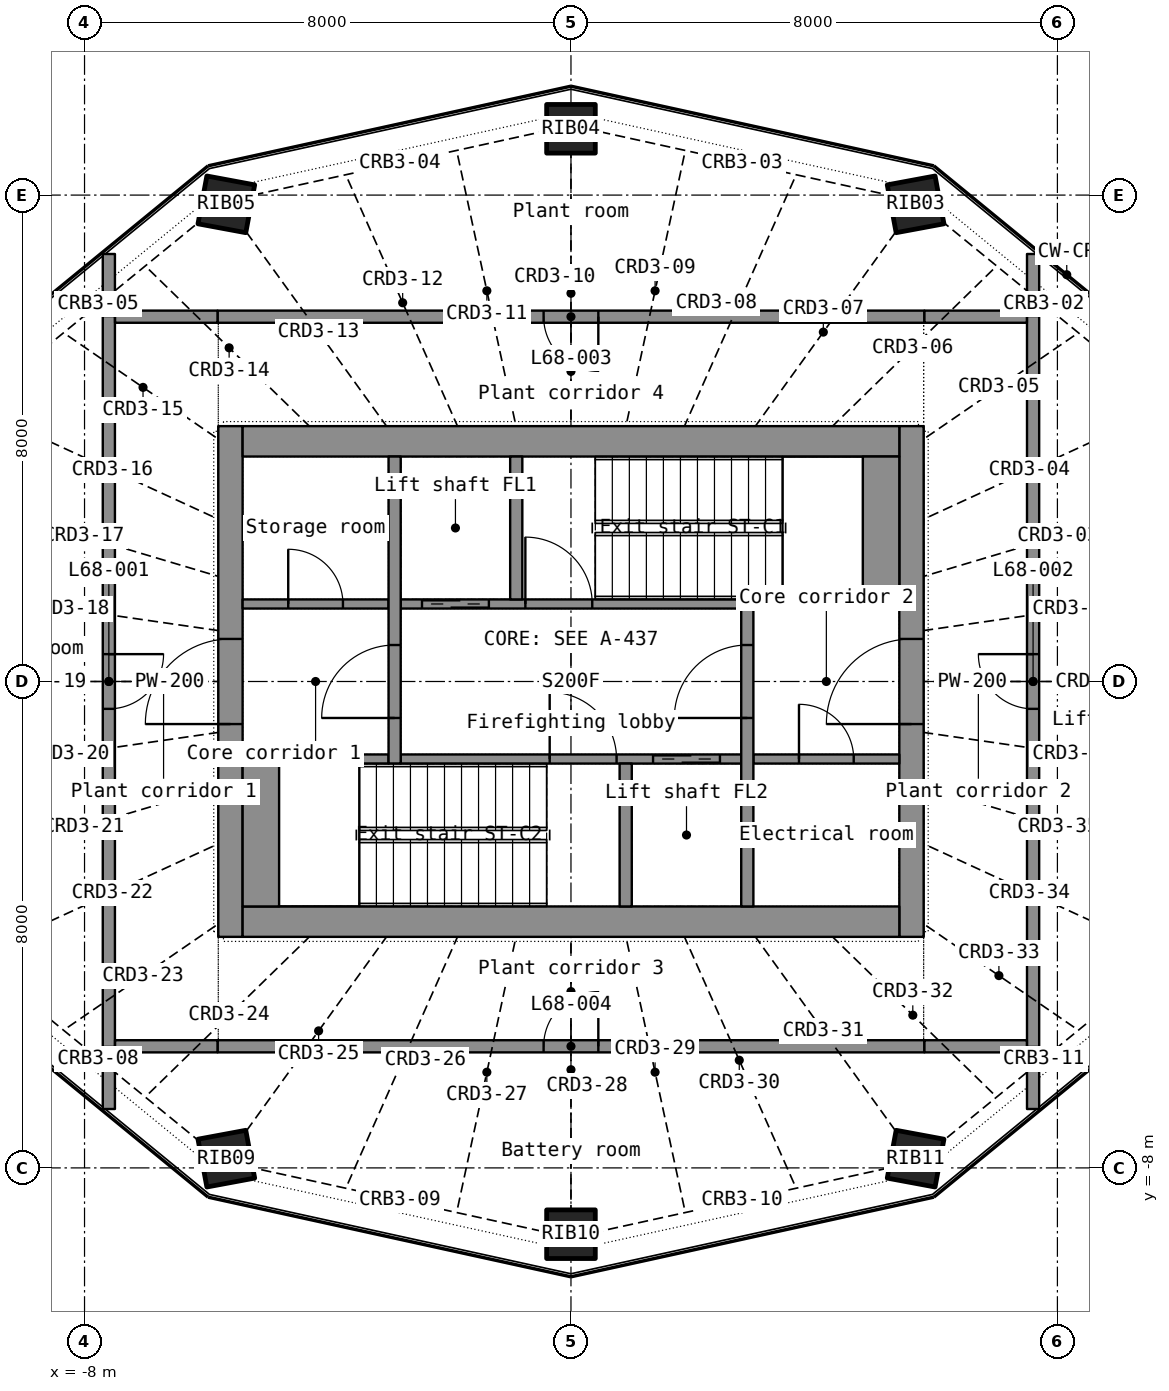
"""IFC4 building model, lengths in metres.
Left out: names, types, materials, properties, quantities, classifications, styles, units other than length and angle.
Written with IfcOpenShell. Run it as: python <this file> out.ifc"""

import sys

from ifc_helpers import new_model, si_unit, direction, frame, frame_2d, origin, origin_2d, place, context, subcontext, project, spatial, rectangle, hollow_rectangle, extrude, element, fill, save


model = new_model("IFC4")
c1 = context("Model", 3, precision=1e-05, world=origin(), true_north=direction((0.0, 1.0)))
c2 = subcontext(c1, "Body", "Model", "MODEL_VIEW")
j1 = project(units=[si_unit("LENGTHUNIT", "METRE"), si_unit("PLANEANGLEUNIT", "RADIAN")], contexts=[c1])
p1 = place(None, origin())
s1 = spatial("IfcSite", under=j1, at=p1, CompositionType="ELEMENT")
p2 = place(p1, origin())
s2 = spatial("IfcBuilding", under=s1, at=p2, CompositionType="ELEMENT")
p3 = place(p2, frame((0.0, 0.0, 280.4)))
s3 = spatial("IfcBuildingStorey", under=s2, at=p3, CompositionType="ELEMENT", Elevation=280.4)
p4 = place(p3, frame((5.668, 7.848, 0.0), z_axis=(-0.069183291, -0.095787468, 0.992994679), x_axis=(0.903250965, -0.428569231, 0.021589555)))
e1 = element("IfcColumn", 1, at=p4, inside=s3, PredefinedType="COLUMN", context=c2, shape_type="SweptSolid", body=[
    extrude(hollow_rectangle(XDim=0.8, YDim=0.8, WallThickness=0.025, at=origin_2d()), origin(), (0.0, 0.0, 1.0), 3.928),
])
p5 = place(p3, frame((0.0, 9.091, 0.0), z_axis=(0.0, -0.111046025, 0.993815265), x_axis=(1.0, 0.0, 0.0)))
e2 = element("IfcColumn", 2, at=p5, inside=s3, PredefinedType="COLUMN", context=c2, shape_type="SweptSolid", body=[
    extrude(hollow_rectangle(XDim=0.8, YDim=0.8, WallThickness=0.025, at=origin_2d()), origin(), (0.0, 0.0, 1.0), 3.924),
])
for number, where, z_axis, x_axis in (
    (3, (-5.668, 7.848, 0.0), (0.069, -0.096, 0.993), (0.903, 0.429, -0.022)),
    (4, (-5.668, -7.848, 0.0), (0.069, 0.096, 0.993), (-0.903, 0.429, 0.022)),
):
    element("IfcColumn", number, at=place(p3, frame(where, z_axis=z_axis, x_axis=x_axis)), inside=s3, PredefinedType="COLUMN", context=c2, shape_type="SweptSolid", body=[
        extrude(hollow_rectangle(XDim=0.8, YDim=0.8, WallThickness=0.025, at=origin_2d()), origin(), (0.0, 0.0, 1.0), 3.928),
    ])
p6 = place(p3, frame((0.0, -9.091, 0.0), z_axis=(0.0, 0.111046025, 0.993815265), x_axis=(-1.0, 0.0, 0.0)))
e5 = element("IfcColumn", 5, at=p6, inside=s3, PredefinedType="COLUMN", context=c2, shape_type="SweptSolid", body=[
    extrude(hollow_rectangle(XDim=0.8, YDim=0.8, WallThickness=0.025, at=origin_2d()), origin(), (0.0, 0.0, 1.0), 3.924),
])
p7 = place(p3, frame((5.668, -7.848, 0.0), z_axis=(-0.069183291, 0.095787468, 0.992994679), x_axis=(-0.903250965, -0.428569231, -0.021589555)))
e6 = element("IfcColumn", 6, at=p7, inside=s3, PredefinedType="COLUMN", context=c2, shape_type="SweptSolid", body=[
    extrude(hollow_rectangle(XDim=0.8, YDim=0.8, WallThickness=0.025, at=origin_2d()), origin(), (0.0, 0.0, 1.0), 3.928),
])
p8 = place(p3, frame((-5.6, -4.2, 0.0), z_axis=(0.0, 0.0, 1.0), x_axis=(0.0, 1.0, 0.0)))
e7 = element("IfcWall", 7, at=p8, inside=s3, PredefinedType="SHEAR", context=c2, shape_type="SweptSolid", body=[
    extrude(rectangle(XDim=8.4, YDim=0.4, at=frame_2d((4.2, 0.0))), origin(), (0.0, 0.0, 1.0), 3.5),
])
p9 = place(p8, frame((3.5, 0.0, 0.0)))
e8 = element("IfcOpeningElement", 8, at=p9, cuts=e7, PredefinedType="OPENING", context=c2, shape_type="SweptSolid", body=[
    extrude(rectangle(XDim=1.4, YDim=2.2, at=frame_2d((0.7, 1.1))), frame((0.0, 0.21, 0.0), z_axis=(0.0, -1.0, 0.0), x_axis=(1.0, 0.0, 0.0)), (0.0, 0.0, 1.0), 0.42),
])
p10 = place(p3, frame((5.6, -4.2, 0.0), z_axis=(0.0, 0.0, 1.0), x_axis=(0.0, 1.0, 0.0)))
e9 = element("IfcWall", 9, at=p10, inside=s3, PredefinedType="SHEAR", context=c2, shape_type="SweptSolid", body=[
    extrude(rectangle(XDim=8.4, YDim=0.4, at=frame_2d((4.2, 0.0))), origin(), (0.0, 0.0, 1.0), 3.5),
])
p11 = place(p10, frame((3.5, 0.0, 0.0)))
e10 = element("IfcOpeningElement", 10, at=p11, cuts=e9, PredefinedType="OPENING", context=c2, shape_type="SweptSolid", body=[
    extrude(rectangle(XDim=1.4, YDim=2.2, at=frame_2d((0.7, 1.1))), frame((0.0, 0.21, 0.0), z_axis=(0.0, -1.0, 0.0), x_axis=(1.0, 0.0, 0.0)), (0.0, 0.0, 1.0), 0.42),
])
for number, where, z_axis, x_axis in (
    (11, (-5.4, -3.95, 0.0), (0.0, 0.0, 1.0), (1.0, 0.0, 0.0)),
    (12, (-5.4, 3.95, 0.0), (0.0, 0.0, 1.0), (1.0, 0.0, 0.0)),
):
    element("IfcWall", number, at=place(p3, frame(where, z_axis=z_axis, x_axis=x_axis)), inside=s3, PredefinedType="SHEAR", context=c2, shape_type="SweptSolid", body=[
        extrude(rectangle(XDim=10.8, YDim=0.5, at=frame_2d((5.4, 0.0))), origin(), (0.0, 0.0, 1.0), 3.5),
    ])
p12 = place(p3, frame((-5.4, -1.275, 0.0), z_axis=(0.0, 0.0, 1.0), x_axis=(1.0, 0.0, 0.0)))
e13 = element("IfcWall", 13, at=p12, inside=s3, PredefinedType="SHEAR", context=c2, shape_type="SweptSolid", body=[
    extrude(rectangle(XDim=2.4, YDim=0.15, at=frame_2d((1.2, 0.0))), origin(), (0.0, 0.0, 1.0), 3.5),
])
p13 = place(p3, frame((-2.8, -1.275, 0.0), z_axis=(0.0, 0.0, 1.0), x_axis=(1.0, 0.0, 0.0)))
e14 = element("IfcWall", 14, at=p13, inside=s3, PredefinedType="SHEAR", context=c2, shape_type="SweptSolid", body=[
    extrude(rectangle(XDim=5.6, YDim=0.15, at=frame_2d((2.8, 0.0))), origin(), (0.0, 0.0, 1.0), 3.5),
])
p14 = place(p13, frame((4.15, 0.0, 0.0)))
e15 = element("IfcOpeningElement", 15, at=p14, cuts=e14, PredefinedType="OPENING", context=c2, shape_type="SweptSolid", body=[
    extrude(rectangle(XDim=1.1, YDim=2.2, at=frame_2d((0.55, 1.1))), frame((0.0, 0.085, 0.0), z_axis=(0.0, -1.0, 0.0), x_axis=(1.0, 0.0, 0.0)), (0.0, 0.0, 1.0), 0.17),
])
p15 = place(p13, frame((2.45, 0.0, 0.0)))
e16 = element("IfcOpeningElement", 16, at=p15, cuts=e14, PredefinedType="OPENING", context=c2, shape_type="SweptSolid", body=[
    extrude(rectangle(XDim=1.1, YDim=2.15, at=frame_2d((0.55, 1.075))), frame((0.0, 0.085, 0.0), z_axis=(0.0, -1.0, 0.0), x_axis=(1.0, 0.0, 0.0)), (0.0, 0.0, 1.0), 0.17),
])
p16 = place(p3, frame((3.0, -1.275, 0.0), z_axis=(0.0, 0.0, 1.0), x_axis=(1.0, 0.0, 0.0)))
e17 = element("IfcWall", 17, at=p16, inside=s3, PredefinedType="PARTITIONING", context=c2, shape_type="SweptSolid", body=[
    extrude(rectangle(XDim=2.4, YDim=0.15, at=frame_2d((1.2, 0.0))), origin(), (0.0, 0.0, 1.0), 3.5),
])
p17 = place(p16, frame((0.75, 0.0, 0.0)))
e18 = element("IfcOpeningElement", 18, at=p17, cuts=e17, PredefinedType="OPENING", context=c2, shape_type="SweptSolid", body=[
    extrude(rectangle(XDim=0.9, YDim=2.1, at=frame_2d((0.45, 1.05))), frame((0.0, 0.085, 0.0), z_axis=(0.0, -1.0, 0.0), x_axis=(1.0, 0.0, 0.0)), (0.0, 0.0, 1.0), 0.17),
])
p18 = place(p3, frame((-5.4, 1.275, 0.0), z_axis=(0.0, 0.0, 1.0), x_axis=(1.0, 0.0, 0.0)))
e19 = element("IfcWall", 19, at=p18, inside=s3, PredefinedType="PARTITIONING", context=c2, shape_type="SweptSolid", body=[
    extrude(rectangle(XDim=2.4, YDim=0.15, at=frame_2d((1.2, 0.0))), origin(), (0.0, 0.0, 1.0), 3.5),
])
p19 = place(p18, frame((0.75, 0.0, 0.0)))
e20 = element("IfcOpeningElement", 20, at=p19, cuts=e19, PredefinedType="OPENING", context=c2, shape_type="SweptSolid", body=[
    extrude(rectangle(XDim=0.9, YDim=2.1, at=frame_2d((0.45, 1.05))), frame((0.0, 0.085, 0.0), z_axis=(0.0, -1.0, 0.0), x_axis=(1.0, 0.0, 0.0)), (0.0, 0.0, 1.0), 0.17),
])
p20 = place(p3, frame((-2.8, 1.275, 0.0), z_axis=(0.0, 0.0, 1.0), x_axis=(1.0, 0.0, 0.0)))
e21 = element("IfcWall", 21, at=p20, inside=s3, PredefinedType="SHEAR", context=c2, shape_type="SweptSolid", body=[
    extrude(rectangle(XDim=5.6, YDim=0.15, at=frame_2d((2.8, 0.0))), origin(), (0.0, 0.0, 1.0), 3.5),
])
p21 = place(p20, frame((0.35, 0.0, 0.0)))
e22 = element("IfcOpeningElement", 22, at=p21, cuts=e21, PredefinedType="OPENING", context=c2, shape_type="SweptSolid", body=[
    extrude(rectangle(XDim=1.1, YDim=2.2, at=frame_2d((0.55, 1.1))), frame((0.0, 0.085, 0.0), z_axis=(0.0, -1.0, 0.0), x_axis=(1.0, 0.0, 0.0)), (0.0, 0.0, 1.0), 0.17),
])
p22 = place(p20, frame((2.05, 0.0, 0.0)))
e23 = element("IfcOpeningElement", 23, at=p22, cuts=e21, PredefinedType="OPENING", context=c2, shape_type="SweptSolid", body=[
    extrude(rectangle(XDim=1.1, YDim=2.15, at=frame_2d((0.55, 1.075))), frame((0.0, 0.085, 0.0), z_axis=(0.0, -1.0, 0.0), x_axis=(1.0, 0.0, 0.0)), (0.0, 0.0, 1.0), 0.17),
])
p23 = place(p3, frame((3.0, 1.275, 0.0), z_axis=(0.0, 0.0, 1.0), x_axis=(1.0, 0.0, 0.0)))
e24 = element("IfcWall", 24, at=p23, inside=s3, PredefinedType="SHEAR", context=c2, shape_type="SweptSolid", body=[
    extrude(rectangle(XDim=2.4, YDim=0.15, at=frame_2d((1.2, 0.0))), origin(), (0.0, 0.0, 1.0), 3.5),
])
p24 = place(p3, frame((-2.9, -1.35, 0.0), z_axis=(0.0, 0.0, 1.0), x_axis=(0.0, 1.0, 0.0)))
e25 = element("IfcWall", 25, at=p24, inside=s3, PredefinedType="SHEAR", context=c2, shape_type="SweptSolid", body=[
    extrude(rectangle(XDim=5.05, YDim=0.2, at=frame_2d((2.525, 0.0))), origin(), (0.0, 0.0, 1.0), 3.5),
])
p25 = place(p24, frame((0.75, 0.0, 0.0)))
e26 = element("IfcOpeningElement", 26, at=p25, cuts=e25, PredefinedType="OPENING", context=c2, shape_type="SweptSolid", body=[
    extrude(rectangle(XDim=1.2, YDim=2.2, at=frame_2d((0.6, 1.1))), frame((0.0, 0.11, 0.0), z_axis=(0.0, -1.0, 0.0), x_axis=(1.0, 0.0, 0.0)), (0.0, 0.0, 1.0), 0.22),
])
p26 = place(p3, frame((2.9, -3.7, 0.0), z_axis=(0.0, 0.0, 1.0), x_axis=(0.0, 1.0, 0.0)))
e27 = element("IfcWall", 27, at=p26, inside=s3, PredefinedType="SHEAR", context=c2, shape_type="SweptSolid", body=[
    extrude(rectangle(XDim=5.05, YDim=0.2, at=frame_2d((2.525, 0.0))), origin(), (0.0, 0.0, 1.0), 3.5),
])
p27 = place(p26, frame((3.1, 0.0, 0.0)))
e28 = element("IfcOpeningElement", 28, at=p27, cuts=e27, PredefinedType="OPENING", context=c2, shape_type="SweptSolid", body=[
    extrude(rectangle(XDim=1.2, YDim=2.2, at=frame_2d((0.6, 1.1))), frame((0.0, 0.11, 0.0), z_axis=(0.0, -1.0, 0.0), x_axis=(1.0, 0.0, 0.0)), (0.0, 0.0, 1.0), 0.22),
])
for number, where, z_axis, x_axis in (
    (29, (-0.9, 1.35, 0.0), (0.0, 0.0, 1.0), (0.0, 1.0, 0.0)),
    (30, (0.9, -3.7, 0.0), (0.0, 0.0, 1.0), (0.0, 1.0, 0.0)),
):
    element("IfcWall", number, at=place(p3, frame(where, z_axis=z_axis, x_axis=x_axis)), inside=s3, PredefinedType="SHEAR", context=c2, shape_type="SweptSolid", body=[
        extrude(rectangle(XDim=2.35, YDim=0.2, at=frame_2d((1.175, 0.0))), origin(), (0.0, 0.0, 1.0), 3.5),
    ])
for number, where, z_axis, x_axis in (
    (31, (5.1, 1.35, 0.0), (0.0, 0.0, 1.0), (0.0, 1.0, 0.0)),
    (32, (-5.1, -3.7, 0.0), (0.0, 0.0, 1.0), (0.0, 1.0, 0.0)),
):
    element("IfcWall", number, at=place(p3, frame(where, z_axis=z_axis, x_axis=x_axis)), inside=s3, PredefinedType="SHEAR", context=c2, shape_type="SweptSolid", body=[
        extrude(rectangle(XDim=2.35, YDim=0.6, at=frame_2d((1.175, 0.0))), origin(), (0.0, 0.0, 1.0), 3.5),
    ])
p28 = place(p3, frame((-7.6, 6.012, 0.0), z_axis=(0.0, 0.0, 1.0), x_axis=(0.0, -1.0, 0.0)))
e33 = element("IfcWall", 33, at=p28, inside=s3, PredefinedType="PARTITIONING", context=c2, shape_type="SweptSolid", body=[
    extrude(rectangle(XDim=12.024, YDim=0.2, at=frame_2d((6.012, 0.0))), origin(), (0.0, 0.0, 1.0), 2.9),
])
p29 = place(p28, frame((5.562, 0.0, 0.0)))
e34 = element("IfcOpeningElement", 34, at=p29, cuts=e33, PredefinedType="OPENING", context=c2, shape_type="SweptSolid", body=[
    extrude(rectangle(XDim=0.9, YDim=2.1, at=frame_2d((0.45, 1.05))), frame((0.0, 0.11, 0.0), z_axis=(0.0, -1.0, 0.0), x_axis=(1.0, 0.0, 0.0)), (0.0, 0.0, 1.0), 0.22),
])
p30 = place(p3, frame((7.6, -6.012, 0.0), z_axis=(0.0, 0.0, 1.0), x_axis=(0.0, 1.0, 0.0)))
e35 = element("IfcWall", 35, at=p30, inside=s3, PredefinedType="PARTITIONING", context=c2, shape_type="SweptSolid", body=[
    extrude(rectangle(XDim=12.024, YDim=0.2, at=frame_2d((6.012, 0.0))), origin(), (0.0, 0.0, 1.0), 2.9),
])
p31 = place(p30, frame((5.562, 0.0, 0.0)))
e36 = element("IfcOpeningElement", 36, at=p31, cuts=e35, PredefinedType="OPENING", context=c2, shape_type="SweptSolid", body=[
    extrude(rectangle(XDim=0.9, YDim=2.1, at=frame_2d((0.45, 1.05))), frame((0.0, 0.11, 0.0), z_axis=(0.0, -1.0, 0.0), x_axis=(1.0, 0.0, 0.0)), (0.0, 0.0, 1.0), 0.22),
])
p32 = place(p3, frame((-5.812, -6.0, 0.0), z_axis=(0.0, 0.0, 1.0), x_axis=(1.0, 0.0, 0.0)))
e37 = element("IfcWall", 37, at=p32, inside=s3, PredefinedType="PARTITIONING", context=c2, shape_type="SweptSolid", body=[
    extrude(rectangle(XDim=11.624, YDim=0.2, at=frame_2d((5.812, 0.0))), origin(), (0.0, 0.0, 1.0), 2.9),
])
p33 = place(p32, frame((5.362, 0.0, 0.0)))
e38 = element("IfcOpeningElement", 38, at=p33, cuts=e37, PredefinedType="OPENING", context=c2, shape_type="SweptSolid", body=[
    extrude(rectangle(XDim=0.9, YDim=2.1, at=frame_2d((0.45, 1.05))), frame((0.0, 0.11, 0.0), z_axis=(0.0, -1.0, 0.0), x_axis=(1.0, 0.0, 0.0)), (0.0, 0.0, 1.0), 0.22),
])
p34 = place(p3, frame((5.812, 6.0, 0.0), z_axis=(0.0, 0.0, 1.0), x_axis=(-1.0, 0.0, 0.0)))
e39 = element("IfcWall", 39, at=p34, inside=s3, PredefinedType="PARTITIONING", context=c2, shape_type="SweptSolid", body=[
    extrude(rectangle(XDim=11.624, YDim=0.2, at=frame_2d((5.812, 0.0))), origin(), (0.0, 0.0, 1.0), 2.9),
])
p35 = place(p34, frame((5.362, 0.0, 0.0)))
e40 = element("IfcOpeningElement", 40, at=p35, cuts=e39, PredefinedType="OPENING", context=c2, shape_type="SweptSolid", body=[
    extrude(rectangle(XDim=0.9, YDim=2.1, at=frame_2d((0.45, 1.05))), frame((0.0, 0.11, 0.0), z_axis=(0.0, -1.0, 0.0), x_axis=(1.0, 0.0, 0.0)), (0.0, 0.0, 1.0), 0.22),
])
for number, where, z_axis, x_axis in (
    (41, (-7.498, -6.0, 0.0), (0.0, 0.0, 1.0), (1.0, 0.0, 0.0)),
    (42, (-5.813, 6.0, 0.0), (0.0, 0.0, 1.0), (-1.0, 0.0, 0.0)),
    (43, (5.813, -6.0, 0.0), (0.0, 0.0, 1.0), (1.0, 0.0, 0.0)),
    (44, (7.498, 6.0, 0.0), (0.0, 0.0, 1.0), (-1.0, 0.0, 0.0)),
):
    element("IfcWall", number, at=place(p3, frame(where, z_axis=z_axis, x_axis=x_axis)), inside=s3, PredefinedType="PARTITIONING", context=c2, shape_type="SweptSolid", body=[
        extrude(rectangle(XDim=1.685, YDim=0.2, at=frame_2d((0.843, 0.0))), origin(), (0.0, 0.0, 1.0), 2.9),
    ])
for number, where, z_axis, x_axis in (
    (45, (-7.6, -7.031, 0.0), (0.0, 0.0, 1.0), (0.0, 1.0, 0.0)),
    (46, (7.6, -6.013, 0.0), (0.0, 0.0, 1.0), (0.0, -1.0, 0.0)),
):
    element("IfcWall", number, at=place(p3, frame(where, z_axis=z_axis, x_axis=x_axis)), inside=s3, PredefinedType="PARTITIONING", context=c2, shape_type="SweptSolid", body=[
        extrude(rectangle(XDim=1.019, YDim=0.2, at=frame_2d((0.509, 0.0))), origin(), (0.0, 0.0, 1.0), 2.9),
    ])
for number, where, z_axis, x_axis in (
    (47, (7.6, 7.031, 0.0), (0.0, 0.0, 1.0), (0.0, -1.0, 0.0)),
    (48, (-7.6, 6.013, 0.0), (0.0, 0.0, 1.0), (0.0, 1.0, 0.0)),
):
    element("IfcWall", number, at=place(p3, frame(where, z_axis=z_axis, x_axis=x_axis)), inside=s3, PredefinedType="PARTITIONING", context=c2, shape_type="SweptSolid", body=[
        extrude(rectangle(XDim=1.018, YDim=0.2, at=frame_2d((0.509, 0.0))), origin(), (0.0, 0.0, 1.0), 2.9),
    ])
p36 = place(p9, origin())
e49 = element("IfcDoor", 49, at=p36, inside=s3, OperationType="DOUBLE_DOOR_SINGLE_SWING", PredefinedType="DOOR", context=c2, shape_type="SweptSolid", body=[
    extrude(rectangle(XDim=1.4, YDim=2.2, at=frame_2d((0.7, 1.1))), frame((0.0, 0.025, 0.0), z_axis=(0.0, -1.0, 0.0), x_axis=(1.0, 0.0, 0.0)), (0.0, 0.0, 1.0), 0.05),
])
fill(e8, e49)
p37 = place(p11, origin())
e50 = element("IfcDoor", 50, at=p37, inside=s3, OperationType="DOUBLE_DOOR_SINGLE_SWING", PredefinedType="DOOR", context=c2, shape_type="SweptSolid", body=[
    extrude(rectangle(XDim=1.4, YDim=2.2, at=frame_2d((0.7, 1.1))), frame((0.0, 0.025, 0.0), z_axis=(0.0, -1.0, 0.0), x_axis=(1.0, 0.0, 0.0)), (0.0, 0.0, 1.0), 0.05),
])
fill(e10, e50)
p38 = place(p25, origin())
e51 = element("IfcDoor", 51, at=p38, inside=s3, OperationType="SINGLE_SWING_LEFT", PredefinedType="DOOR", context=c2, shape_type="SweptSolid", body=[
    extrude(rectangle(XDim=1.2, YDim=2.2, at=frame_2d((0.6, 1.1))), frame((0.0, 0.025, 0.0), z_axis=(0.0, -1.0, 0.0), x_axis=(1.0, 0.0, 0.0)), (0.0, 0.0, 1.0), 0.05),
])
fill(e26, e51)
p39 = place(p27, origin())
e52 = element("IfcDoor", 52, at=p39, inside=s3, OperationType="SINGLE_SWING_LEFT", PredefinedType="DOOR", context=c2, shape_type="SweptSolid", body=[
    extrude(rectangle(XDim=1.2, YDim=2.2, at=frame_2d((0.6, 1.1))), frame((0.0, 0.025, 0.0), z_axis=(0.0, -1.0, 0.0), x_axis=(1.0, 0.0, 0.0)), (0.0, 0.0, 1.0), 0.05),
])
fill(e28, e52)
p40 = place(p21, origin())
e53 = element("IfcDoor", 53, at=p40, inside=s3, OperationType="DOUBLE_DOOR_SLIDING", PredefinedType="DOOR", context=c2, shape_type="SweptSolid", body=[
    extrude(rectangle(XDim=1.1, YDim=2.2, at=frame_2d((0.55, 1.1))), frame((0.0, 0.025, 0.0), z_axis=(0.0, -1.0, 0.0), x_axis=(1.0, 0.0, 0.0)), (0.0, 0.0, 1.0), 0.05),
])
fill(e22, e53)
p41 = place(p14, origin())
e54 = element("IfcDoor", 54, at=p41, inside=s3, OperationType="DOUBLE_DOOR_SLIDING", PredefinedType="DOOR", context=c2, shape_type="SweptSolid", body=[
    extrude(rectangle(XDim=1.1, YDim=2.2, at=frame_2d((0.55, 1.1))), frame((0.0, 0.025, 0.0), z_axis=(0.0, -1.0, 0.0), x_axis=(1.0, 0.0, 0.0)), (0.0, 0.0, 1.0), 0.05),
])
fill(e15, e54)
p42 = place(p22, origin())
e55 = element("IfcDoor", 55, at=p42, inside=s3, OperationType="SINGLE_SWING_LEFT", PredefinedType="DOOR", context=c2, shape_type="SweptSolid", body=[
    extrude(rectangle(XDim=1.1, YDim=2.15, at=frame_2d((0.55, 1.075))), frame((0.0, 0.025, 0.0), z_axis=(0.0, -1.0, 0.0), x_axis=(1.0, 0.0, 0.0)), (0.0, 0.0, 1.0), 0.05),
])
fill(e23, e55)
p43 = place(p15, origin())
e56 = element("IfcDoor", 56, at=p43, inside=s3, OperationType="SINGLE_SWING_LEFT", PredefinedType="DOOR", context=c2, shape_type="SweptSolid", body=[
    extrude(rectangle(XDim=1.1, YDim=2.15, at=frame_2d((0.55, 1.075))), frame((0.0, 0.025, 0.0), z_axis=(0.0, -1.0, 0.0), x_axis=(1.0, 0.0, 0.0)), (0.0, 0.0, 1.0), 0.05),
])
fill(e16, e56)
p44 = place(p19, origin())
e57 = element("IfcDoor", 57, at=p44, inside=s3, OperationType="SINGLE_SWING_LEFT", PredefinedType="DOOR", context=c2, shape_type="SweptSolid", body=[
    extrude(rectangle(XDim=0.9, YDim=2.1, at=frame_2d((0.45, 1.05))), frame((0.0, 0.025, 0.0), z_axis=(0.0, -1.0, 0.0), x_axis=(1.0, 0.0, 0.0)), (0.0, 0.0, 1.0), 0.05),
])
fill(e20, e57)
p45 = place(p17, origin())
e58 = element("IfcDoor", 58, at=p45, inside=s3, OperationType="SINGLE_SWING_LEFT", PredefinedType="DOOR", context=c2, shape_type="SweptSolid", body=[
    extrude(rectangle(XDim=0.9, YDim=2.1, at=frame_2d((0.45, 1.05))), frame((0.0, 0.025, 0.0), z_axis=(0.0, -1.0, 0.0), x_axis=(1.0, 0.0, 0.0)), (0.0, 0.0, 1.0), 0.05),
])
fill(e18, e58)
p46 = place(p29, origin())
e59 = element("IfcDoor", 59, at=p46, inside=s3, OperationType="SINGLE_SWING_LEFT", PredefinedType="DOOR", context=c2, shape_type="SweptSolid", body=[
    extrude(rectangle(XDim=0.9, YDim=2.1, at=frame_2d((0.45, 1.05))), frame((0.0, 0.025, 0.0), z_axis=(0.0, -1.0, 0.0), x_axis=(1.0, 0.0, 0.0)), (0.0, 0.0, 1.0), 0.05),
])
fill(e34, e59)
p47 = place(p31, origin())
e60 = element("IfcDoor", 60, at=p47, inside=s3, OperationType="SINGLE_SWING_RIGHT", PredefinedType="DOOR", context=c2, shape_type="SweptSolid", body=[
    extrude(rectangle(XDim=0.9, YDim=2.1, at=frame_2d((0.45, 1.05))), frame((0.0, 0.025, 0.0), z_axis=(0.0, -1.0, 0.0), x_axis=(1.0, 0.0, 0.0)), (0.0, 0.0, 1.0), 0.05),
])
fill(e36, e60)
p48 = place(p35, origin())
e61 = element("IfcDoor", 61, at=p48, inside=s3, OperationType="SINGLE_SWING_LEFT", PredefinedType="DOOR", context=c2, shape_type="SweptSolid", body=[
    extrude(rectangle(XDim=0.9, YDim=2.1, at=frame_2d((0.45, 1.05))), frame((0.0, 0.025, 0.0), z_axis=(0.0, -1.0, 0.0), x_axis=(1.0, 0.0, 0.0)), (0.0, 0.0, 1.0), 0.05),
])
fill(e40, e61)
p49 = place(p33, origin())
e62 = element("IfcDoor", 62, at=p49, inside=s3, OperationType="SINGLE_SWING_RIGHT", PredefinedType="DOOR", context=c2, shape_type="SweptSolid", body=[
    extrude(rectangle(XDim=0.9, YDim=2.1, at=frame_2d((0.45, 1.05))), frame((0.0, 0.025, 0.0), z_axis=(0.0, -1.0, 0.0), x_axis=(1.0, 0.0, 0.0)), (0.0, 0.0, 1.0), 0.05),
])
fill(e38, e62)
save(model, sys.argv[1])
